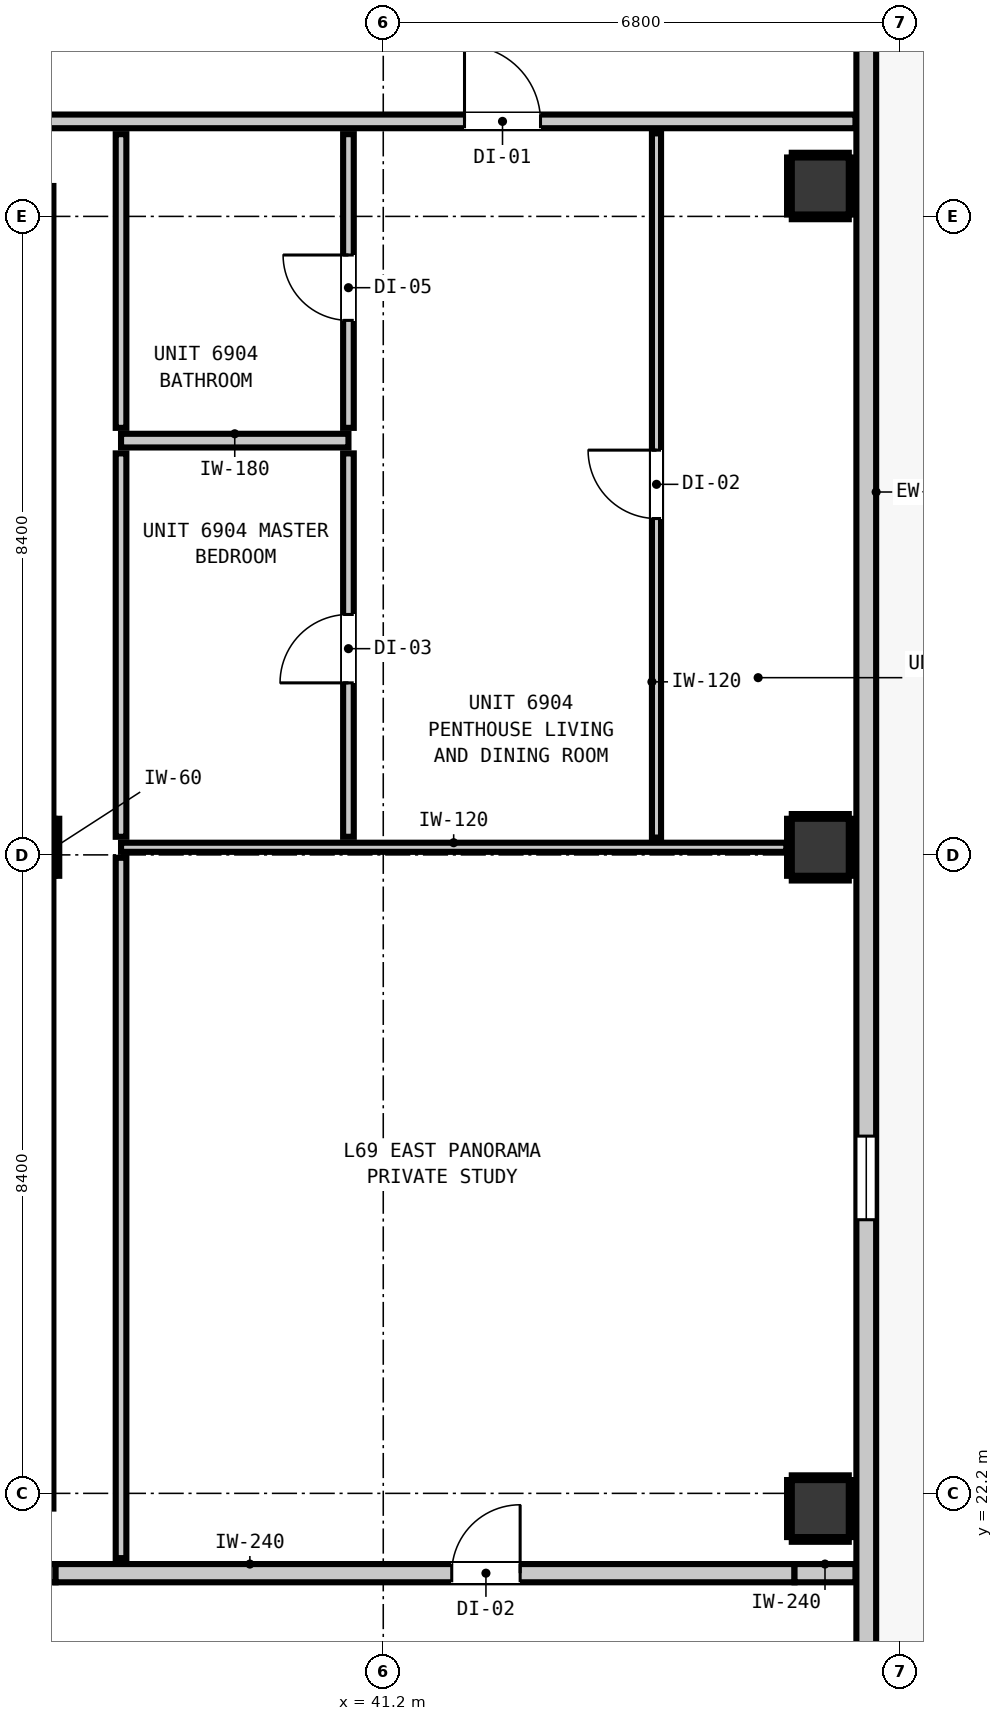
"""IFC4 building model, lengths in metres.
Left out: names, types, materials, properties, quantities, classifications, styles, units other than length and angle.
Written with IfcOpenShell. Run it as: python <this file> out.ifc"""

import sys

from ifc_helpers import new_model, si_unit, direction, frame, frame_2d, origin, origin_2d, place, context, subcontext, project, spatial, rectangle, extrude, element, fill, save


model = new_model("IFC4")
c1 = context("Model", 3, precision=1e-05, world=origin(), true_north=direction((0.0, 1.0)))
c2 = subcontext(c1, "Body", "Model", "MODEL_VIEW")
j1 = project(units=[si_unit("LENGTHUNIT", "METRE"), si_unit("PLANEANGLEUNIT", "RADIAN")], contexts=[c1])
p1 = place(None, origin())
s1 = spatial("IfcSite", under=j1, at=p1, CompositionType="ELEMENT")
p2 = place(p1, origin())
s2 = spatial("IfcBuilding", under=s1, at=p2, CompositionType="ELEMENT")
p3 = place(p2, frame((0.0, 0.0, 237.92)))
s3 = spatial("IfcBuildingStorey", under=s2, at=p3, CompositionType="ELEMENT", Elevation=237.92)
p4 = place(p3, frame((36.5, 30.7, 0.0), z_axis=(0.0, 0.0, 1.0), x_axis=(1.0, 0.0, 0.0)))
e1 = element("IfcColumn", 1, at=p4, inside=s3, PredefinedType="COLUMN", context=c2, shape_type="SweptSolid", body=[
    extrude(rectangle(XDim=0.75, YDim=0.75, at=origin_2d()), origin(), (0.0, 0.0, 1.0), 3.32),
])
p5 = place(p3, frame((36.46, 22.0, 0.0), z_axis=(0.0, 0.0, 1.0), x_axis=(0.0, 1.0, 0.0)))
e2 = element("IfcWall", 2, at=p5, inside=s3, PredefinedType="SHEAR", context=c2, shape_type="SweptSolid", body=[
    extrude(rectangle(XDim=8.32, YDim=0.8, at=frame_2d((4.16, 0.0))), origin(), (0.0, 0.0, 1.0), 3.32),
])
p6 = place(p3, frame((36.46, 31.08, 0.0), z_axis=(0.0, 0.0, 1.0), x_axis=(0.0, 1.0, 0.0)))
e3 = element("IfcWall", 3, at=p6, inside=s3, PredefinedType="SHEAR", context=c2, shape_type="SweptSolid", body=[
    extrude(rectangle(XDim=8.32, YDim=0.8, at=frame_2d((4.16, 0.0))), origin(), (0.0, 0.0, 1.0), 3.32),
])
for number, where, z_axis, x_axis in (
    (4, (46.95, 22.0, 0.0), (0.0, 0.0, 1.0), (1.0, 0.0, 0.0)),
    (5, (46.95, 30.7, 0.0), (0.0, 0.0, 1.0), (1.0, 0.0, 0.0)),
    (6, (46.95, 39.4, 0.0), (0.0, 0.0, 1.0), (1.0, 0.0, 0.0)),
):
    element("IfcColumn", number, at=place(p3, frame(where, z_axis=z_axis, x_axis=x_axis)), inside=s3, PredefinedType="COLUMN", context=c2, shape_type="SweptSolid", body=[
        extrude(rectangle(XDim=0.75, YDim=0.75, at=origin_2d()), origin(), (0.0, 0.0, 1.0), 3.32),
    ])
p7 = place(p3, frame((47.555, 48.855, 0.0), z_axis=(0.0, 0.0, 1.0), x_axis=(0.0, -1.0, 0.0)))
e7 = element("IfcWall", 7, at=p7, inside=s3, PredefinedType="STANDARD", context=c2, shape_type="SweptSolid", body=[
    extrude(rectangle(XDim=30.31, YDim=0.26, at=frame_2d((15.155, 0.0))), origin(), (0.0, 0.0, 1.0), 3.1),
])
p8 = place(p7, frame((0.91, 0.0, 0.0)))
e8 = element("IfcOpeningElement", 8, at=p8, cuts=e7, PredefinedType="OPENING", context=c2, shape_type="SweptSolid", body=[
    extrude(rectangle(XDim=1.0, YDim=2.15, at=frame_2d((0.5, 1.075))), frame((0.0, 0.14, 0.0), z_axis=(0.0, -1.0, 0.0), x_axis=(1.0, 0.0, 0.0)), (0.0, 0.0, 1.0), 0.28),
])
p9 = place(p7, frame((3.907, 0.0, 0.85)))
e9 = element("IfcOpeningElement", 9, at=p9, cuts=e7, PredefinedType="OPENING", context=c2, shape_type="SweptSolid", body=[
    extrude(rectangle(XDim=1.1, YDim=2.05, at=frame_2d((0.55, 1.025))), frame((0.0, 0.14, 0.0), z_axis=(0.0, -1.0, 0.0), x_axis=(1.0, 0.0, 0.0)), (0.0, 0.0, 1.0), 0.28),
])
p10 = place(p7, frame((21.955, 0.0, 0.85)))
e10 = element("IfcOpeningElement", 10, at=p10, cuts=e7, PredefinedType="OPENING", context=c2, shape_type="SweptSolid", body=[
    extrude(rectangle(XDim=1.1, YDim=2.05, at=frame_2d((0.55, 1.025))), frame((0.0, 0.14, 0.0), z_axis=(0.0, -1.0, 0.0), x_axis=(1.0, 0.0, 0.0)), (0.0, 0.0, 1.0), 0.28),
])
p11 = place(p3, frame((10.787, 21.15, 0.0), z_axis=(0.0, 0.0, 1.0), x_axis=(1.0, 0.0, 0.0)))
e11 = element("IfcWall", 11, at=p11, inside=s3, PredefinedType="PARTITIONING", context=c2, shape_type="SweptSolid", body=[
    extrude(rectangle(XDim=26.102, YDim=0.24, at=frame_2d((13.051, 0.0))), origin(), (0.0, 0.0, 1.0), 3.1),
])
p12 = place(p11, frame((7.423, 0.0, 0.0)))
e12 = element("IfcOpeningElement", 12, at=p12, cuts=e11, PredefinedType="OPENING", context=c2, shape_type="SweptSolid", body=[
    extrude(rectangle(XDim=1.1, YDim=2.15, at=frame_2d((0.55, 1.075))), frame((0.0, 0.13, 0.0), z_axis=(0.0, -1.0, 0.0), x_axis=(1.0, 0.0, 0.0)), (0.0, 0.0, 1.0), 0.26),
])
p13 = place(p3, frame((36.889, 21.15, 0.0), z_axis=(0.0, 0.0, 1.0), x_axis=(1.0, 0.0, 0.0)))
e13 = element("IfcWall", 13, at=p13, inside=s3, PredefinedType="PARTITIONING", context=c2, shape_type="SweptSolid", body=[
    extrude(rectangle(XDim=9.722, YDim=0.24, at=frame_2d((4.861, 0.0))), origin(), (0.0, 0.0, 1.0), 2.477),
])
p14 = place(p13, frame((5.212, 0.0, 0.0)))
e14 = element("IfcOpeningElement", 14, at=p14, cuts=e13, PredefinedType="OPENING", context=c2, shape_type="SweptSolid", body=[
    extrude(rectangle(XDim=0.9, YDim=2.1, at=frame_2d((0.45, 1.05))), frame((0.0, 0.13, 0.0), z_axis=(0.0, -1.0, 0.0), x_axis=(1.0, 0.0, 0.0)), (0.0, 0.0, 1.0), 0.26),
])
p15 = place(p3, frame((46.611, 21.15, 0.0), z_axis=(0.0, 0.0, 1.0), x_axis=(1.0, 0.0, 0.0)))
e15 = element("IfcWall", 15, at=p15, inside=s3, PredefinedType="PARTITIONING", context=c2, shape_type="SweptSolid", body=[
    extrude(rectangle(XDim=0.802, YDim=0.24, at=frame_2d((0.401, 0.0))), origin(), (0.0, 0.0, 1.0), 3.1),
])
p16 = place(p3, frame((37.75, 36.05, 0.0), z_axis=(0.0, 0.0, 1.0), x_axis=(1.0, 0.0, 0.0)))
e16 = element("IfcWall", 16, at=p16, inside=s3, PredefinedType="PARTITIONING", context=c2, shape_type="SweptSolid", body=[
    extrude(rectangle(XDim=2.992, YDim=0.18, at=frame_2d((1.496, 0.0))), origin(), (0.0, 0.0, 1.0), 3.1),
])
p17 = place(p3, frame((10.787, 40.25, 0.0), z_axis=(0.0, 0.0, 1.0), x_axis=(1.0, 0.0, 0.0)))
e17 = element("IfcWall", 17, at=p17, inside=s3, PredefinedType="PARTITIONING", context=c2, shape_type="SweptSolid", body=[
    extrude(rectangle(XDim=36.626, YDim=0.18, at=frame_2d((18.313, 0.0))), origin(), (0.0, 0.0, 1.0), 3.1),
])
p18 = place(p17, frame((6.648, 0.0, 0.0)))
e18 = element("IfcOpeningElement", 18, at=p18, cuts=e17, PredefinedType="OPENING", context=c2, shape_type="SweptSolid", body=[
    extrude(rectangle(XDim=1.4, YDim=2.15, at=frame_2d((0.7, 1.075))), frame((0.0, 0.1, 0.0), z_axis=(0.0, -1.0, 0.0), x_axis=(1.0, 0.0, 0.0)), (0.0, 0.0, 1.0), 0.2),
])
p19 = place(p17, frame((31.482, 0.0, 0.0)))
e19 = element("IfcOpeningElement", 19, at=p19, cuts=e17, PredefinedType="OPENING", context=c2, shape_type="SweptSolid", body=[
    extrude(rectangle(XDim=1.0, YDim=2.15, at=frame_2d((0.5, 1.075))), frame((0.0, 0.1, 0.0), z_axis=(0.0, -1.0, 0.0), x_axis=(1.0, 0.0, 0.0)), (0.0, 0.0, 1.0), 0.2),
])
p20 = place(p3, frame((37.75, 30.7, 0.0), z_axis=(0.0, 0.0, 1.0), x_axis=(1.0, 0.0, 0.0)))
e20 = element("IfcWall", 20, at=p20, inside=s3, PredefinedType="PARTITIONING", context=c2, shape_type="SweptSolid", body=[
    extrude(rectangle(XDim=8.753, YDim=0.12, at=frame_2d((4.376, 0.0))), origin(), (0.0, 0.0, 1.0), 2.335),
])
p21 = place(p3, frame((37.75, 21.348, 0.0), z_axis=(0.0, 0.0, 1.0), x_axis=(0.0, 1.0, 0.0)))
e21 = element("IfcWall", 21, at=p21, inside=s3, PredefinedType="PARTITIONING", context=c2, shape_type="SweptSolid", body=[
    extrude(rectangle(XDim=9.214, YDim=0.14, at=frame_2d((4.607, 0.0))), origin(), (0.0, 0.0, 1.0), 3.1),
])
p22 = place(p3, frame((37.75, 30.838, 0.0), z_axis=(0.0, 0.0, 1.0), x_axis=(0.0, 1.0, 0.0)))
e22 = element("IfcWall", 22, at=p22, inside=s3, PredefinedType="PARTITIONING", context=c2, shape_type="SweptSolid", body=[
    extrude(rectangle(XDim=5.044, YDim=0.14, at=frame_2d((2.522, 0.0))), origin(), (0.0, 0.0, 1.0), 3.1),
])
p23 = place(p3, frame((37.75, 36.218, 0.0), z_axis=(0.0, 0.0, 1.0), x_axis=(0.0, 1.0, 0.0)))
e23 = element("IfcWall", 23, at=p23, inside=s3, PredefinedType="PARTITIONING", context=c2, shape_type="SweptSolid", body=[
    extrude(rectangle(XDim=3.864, YDim=0.14, at=frame_2d((1.932, 0.0))), origin(), (0.0, 0.0, 1.0), 3.1),
])
p24 = place(p3, frame((40.742, 30.838, 0.0), z_axis=(0.0, 0.0, 1.0), x_axis=(0.0, 1.0, 0.0)))
e24 = element("IfcWall", 24, at=p24, inside=s3, PredefinedType="PARTITIONING", context=c2, shape_type="SweptSolid", body=[
    extrude(rectangle(XDim=5.044, YDim=0.14, at=frame_2d((2.522, 0.0))), origin(), (0.0, 0.0, 1.0), 3.1),
])
p25 = place(p24, frame((2.025, 0.0, 0.0)))
e25 = element("IfcOpeningElement", 25, at=p25, cuts=e24, PredefinedType="OPENING", context=c2, shape_type="SweptSolid", body=[
    extrude(rectangle(XDim=0.9, YDim=2.1, at=frame_2d((0.45, 1.05))), frame((0.0, 0.08, 0.0), z_axis=(0.0, -1.0, 0.0), x_axis=(1.0, 0.0, 0.0)), (0.0, 0.0, 1.0), 0.16),
])
p26 = place(p3, frame((40.742, 36.218, 0.0), z_axis=(0.0, 0.0, 1.0), x_axis=(0.0, 1.0, 0.0)))
e26 = element("IfcWall", 26, at=p26, inside=s3, PredefinedType="PARTITIONING", context=c2, shape_type="SweptSolid", body=[
    extrude(rectangle(XDim=3.864, YDim=0.14, at=frame_2d((1.932, 0.0))), origin(), (0.0, 0.0, 1.0), 3.1),
])
p27 = place(p26, frame((1.414, 0.0, 0.0)))
e27 = element("IfcOpeningElement", 27, at=p27, cuts=e26, PredefinedType="OPENING", context=c2, shape_type="SweptSolid", body=[
    extrude(rectangle(XDim=0.86, YDim=2.02, at=frame_2d((0.43, 1.01))), frame((0.0, 0.08, 0.0), z_axis=(0.0, -1.0, 0.0), x_axis=(1.0, 0.0, 0.0)), (0.0, 0.0, 1.0), 0.16),
])
p28 = place(p3, frame((44.795, 30.828, 0.0), z_axis=(0.0, 0.0, 1.0), x_axis=(0.0, 1.0, 0.0)))
e28 = element("IfcWall", 28, at=p28, inside=s3, PredefinedType="PARTITIONING", context=c2, shape_type="SweptSolid", body=[
    extrude(rectangle(XDim=9.264, YDim=0.12, at=frame_2d((4.632, 0.0))), origin(), (0.0, 0.0, 1.0), 3.1),
])
p29 = place(p28, frame((4.197, 0.0, 0.0)))
e29 = element("IfcOpeningElement", 29, at=p29, cuts=e28, PredefinedType="OPENING", context=c2, shape_type="SweptSolid", body=[
    extrude(rectangle(XDim=0.9, YDim=2.1, at=frame_2d((0.45, 1.05))), frame((0.0, 0.07, 0.0), z_axis=(0.0, -1.0, 0.0), x_axis=(1.0, 0.0, 0.0)), (0.0, 0.0, 1.0), 0.14),
])
for number, where, z_axis, x_axis in (
    (30, (36.907, 30.325, 0.0), (0.0, 0.0, 1.0), (0.0, 1.0, 0.0)),
    (31, (46.575, 21.593, 0.0), (0.0, 0.0, 1.0), (1.0, 0.0, 0.0)),
    (32, (46.575, 22.407, 0.0), (0.0, 0.0, 1.0), (1.0, 0.0, 0.0)),
    (33, (46.543, 21.625, 0.0), (0.0, 0.0, 1.0), (0.0, 1.0, 0.0)),
    (34, (47.357, 21.625, 0.0), (0.0, 0.0, 1.0), (0.0, 1.0, 0.0)),
    (35, (46.575, 30.293, 0.0), (0.0, 0.0, 1.0), (1.0, 0.0, 0.0)),
    (36, (46.575, 31.107, 0.0), (0.0, 0.0, 1.0), (1.0, 0.0, 0.0)),
    (37, (46.543, 30.325, 0.0), (0.0, 0.0, 1.0), (0.0, 1.0, 0.0)),
    (38, (47.357, 30.325, 0.0), (0.0, 0.0, 1.0), (0.0, 1.0, 0.0)),
    (39, (46.575, 38.993, 0.0), (0.0, 0.0, 1.0), (1.0, 0.0, 0.0)),
    (40, (46.575, 39.807, 0.0), (0.0, 0.0, 1.0), (1.0, 0.0, 0.0)),
    (41, (46.543, 39.025, 0.0), (0.0, 0.0, 1.0), (0.0, 1.0, 0.0)),
    (42, (47.357, 39.025, 0.0), (0.0, 0.0, 1.0), (0.0, 1.0, 0.0)),
):
    element("IfcWall", number, at=place(p3, frame(where, z_axis=z_axis, x_axis=x_axis)), inside=s3, PredefinedType="PARTITIONING", context=c2, shape_type="SweptSolid", body=[
        extrude(rectangle(XDim=0.75, YDim=0.06, at=frame_2d((0.375, 0.0))), origin(), (0.0, 0.0, 1.0), 1.45),
    ])
p30 = place(p10, origin())
e43 = element("IfcWindow", 43, at=p30, inside=s3, PartitioningType="SINGLE_PANEL", PredefinedType="WINDOW", context=c2, shape_type="SweptSolid", body=[
    extrude(rectangle(XDim=1.1, YDim=2.05, at=frame_2d((0.55, 1.025))), frame((0.0, 0.03, 0.0), z_axis=(0.0, -1.0, 0.0), x_axis=(1.0, 0.0, 0.0)), (0.0, 0.0, 1.0), 0.06),
])
fill(e10, e43)
p31 = place(p14, origin())
e44 = element("IfcDoor", 44, at=p31, inside=s3, OperationType="SINGLE_SWING_RIGHT", PredefinedType="DOOR", context=c2, shape_type="SweptSolid", body=[
    extrude(rectangle(XDim=0.9, YDim=2.1, at=frame_2d((0.45, 1.05))), frame((0.0, 0.025, 0.0), z_axis=(0.0, -1.0, 0.0), x_axis=(1.0, 0.0, 0.0)), (0.0, 0.0, 1.0), 0.05),
])
fill(e14, e44)
p32 = place(p19, origin())
e45 = element("IfcDoor", 45, at=p32, inside=s3, OperationType="SINGLE_SWING_LEFT", PredefinedType="DOOR", context=c2, shape_type="SweptSolid", body=[
    extrude(rectangle(XDim=1.0, YDim=2.15, at=frame_2d((0.5, 1.075))), frame((0.0, 0.025, 0.0), z_axis=(0.0, -1.0, 0.0), x_axis=(1.0, 0.0, 0.0)), (0.0, 0.0, 1.0), 0.05),
])
fill(e19, e45)
p33 = place(p27, origin())
e46 = element("IfcDoor", 46, at=p33, inside=s3, OperationType="SINGLE_SWING_RIGHT", PredefinedType="DOOR", context=c2, shape_type="SweptSolid", body=[
    extrude(rectangle(XDim=0.86, YDim=2.02, at=frame_2d((0.43, 1.01))), frame((0.0, 0.025, 0.0), z_axis=(0.0, -1.0, 0.0), x_axis=(1.0, 0.0, 0.0)), (0.0, 0.0, 1.0), 0.05),
])
fill(e27, e46)
p34 = place(p25, origin())
e47 = element("IfcDoor", 47, at=p34, inside=s3, OperationType="SINGLE_SWING_LEFT", PredefinedType="DOOR", context=c2, shape_type="SweptSolid", body=[
    extrude(rectangle(XDim=0.9, YDim=2.1, at=frame_2d((0.45, 1.05))), frame((0.0, 0.025, 0.0), z_axis=(0.0, -1.0, 0.0), x_axis=(1.0, 0.0, 0.0)), (0.0, 0.0, 1.0), 0.05),
])
fill(e25, e47)
p35 = place(p29, origin())
e48 = element("IfcDoor", 48, at=p35, inside=s3, OperationType="SINGLE_SWING_RIGHT", PredefinedType="DOOR", context=c2, shape_type="SweptSolid", body=[
    extrude(rectangle(XDim=0.9, YDim=2.1, at=frame_2d((0.45, 1.05))), frame((0.0, 0.025, 0.0), z_axis=(0.0, -1.0, 0.0), x_axis=(1.0, 0.0, 0.0)), (0.0, 0.0, 1.0), 0.05),
])
fill(e29, e48)
save(model, sys.argv[1])
